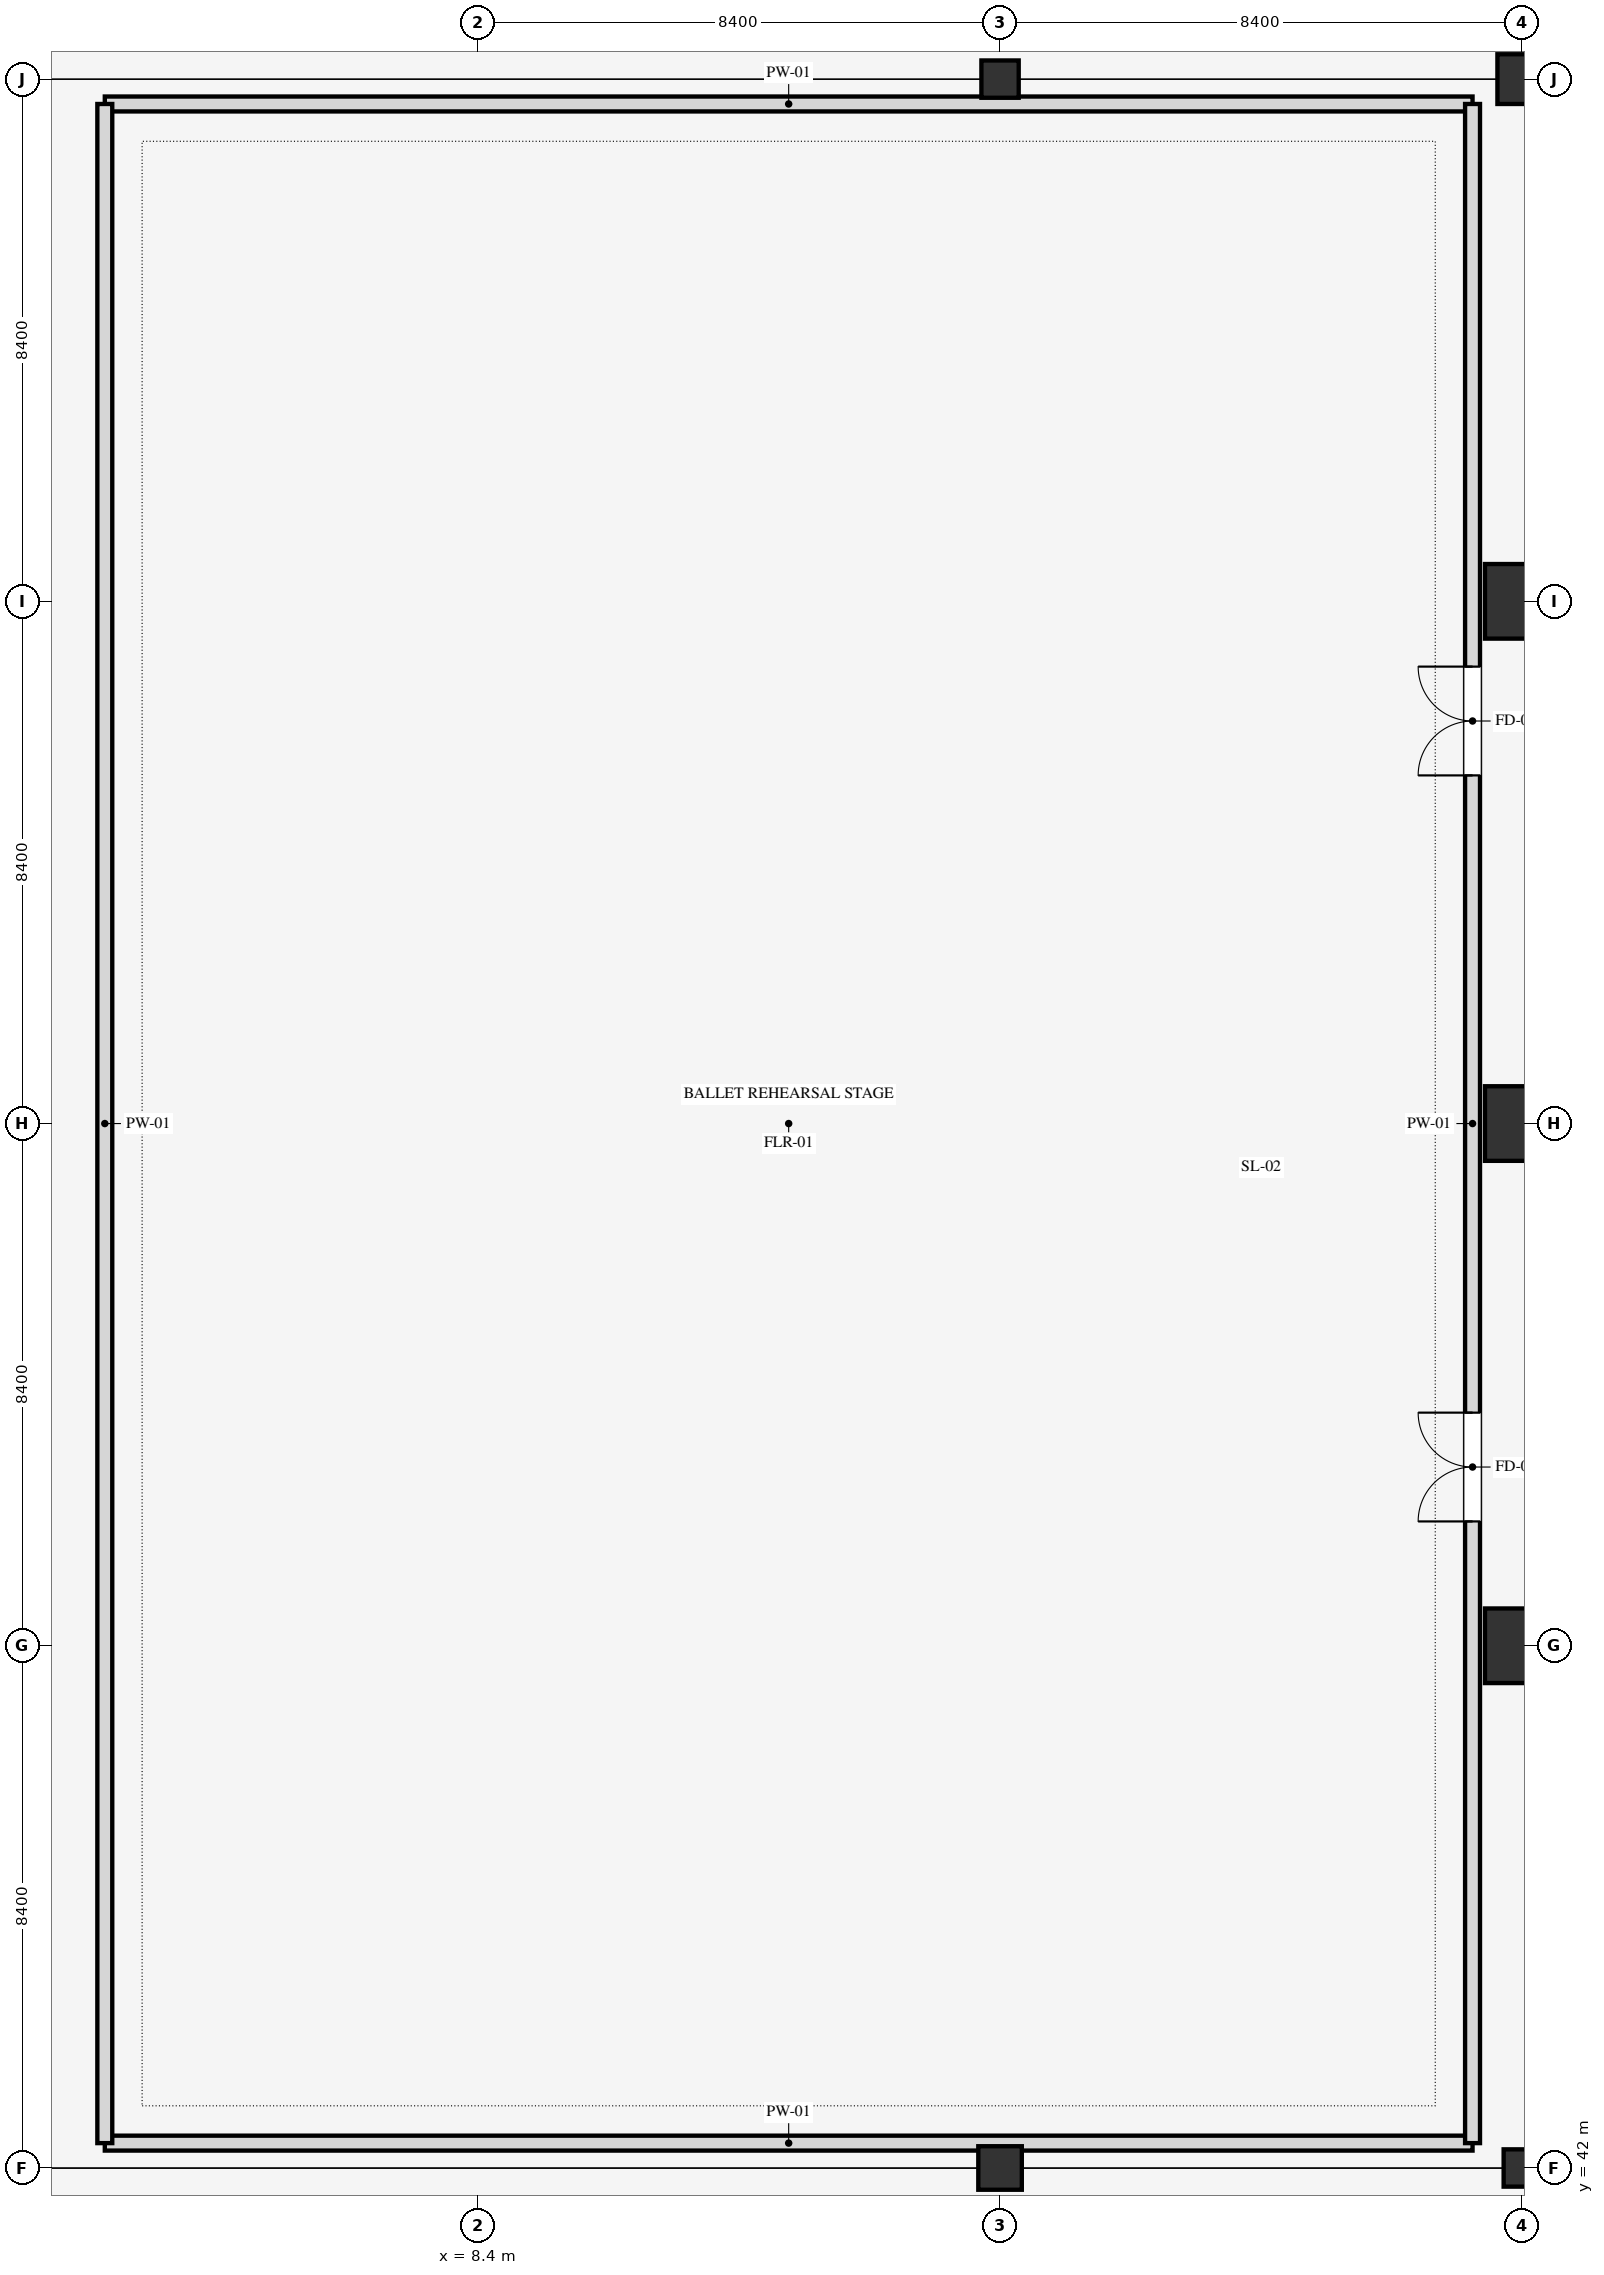
"""IFC4 building model, lengths in metres.
Left out: names, types, materials, properties, quantities, classifications, styles, units other than length and angle.
Written with IfcOpenShell. Run it as: python <this file> out.ifc"""

import sys

from ifc_helpers import new_model, si_unit, direction, frame, frame_2d, origin, origin_2d, place, context, subcontext, project, spatial, rectangle, extrude, element, fill, save


model = new_model("IFC4")
c1 = context("Model", 3, precision=1e-05, world=origin(), true_north=direction((0.0, 1.0)))
c2 = subcontext(c1, "Body", "Model", "MODEL_VIEW")
j1 = project(units=[si_unit("LENGTHUNIT", "METRE"), si_unit("PLANEANGLEUNIT", "RADIAN")], contexts=[c1])
p1 = place(None, origin())
s1 = spatial("IfcSite", under=j1, at=p1, CompositionType="ELEMENT")
p2 = place(p1, origin())
s2 = spatial("IfcBuilding", under=s1, at=p2, CompositionType="ELEMENT")
p3 = place(p2, frame((0.0, 0.0, 9.9)))
s3 = spatial("IfcBuildingStorey", under=s2, at=p3, CompositionType="ELEMENT", Elevation=9.9)
p4 = place(p3, frame((16.8, 42.0, 0.0), z_axis=(0.0, 0.0, 1.0), x_axis=(1.0, 0.0, 0.0)))
e1 = element("IfcColumn", 1, at=p4, inside=s3, PredefinedType="COLUMN", context=c2, shape_type="SweptSolid", body=[
    extrude(rectangle(XDim=0.7, YDim=0.7, at=origin_2d()), origin(), (0.0, 0.0, 1.0), 4.5),
])
for number, where, z_axis, x_axis in (
    (2, (16.8, 75.6, 0.0), (0.0, 0.0, 1.0), (1.0, 0.0, 0.0)),
    (3, (25.2, 42.0, 0.0), (0.0, 0.0, 1.0), (1.0, 0.0, 0.0)),
):
    element("IfcColumn", number, at=place(p3, frame(where, z_axis=z_axis, x_axis=x_axis)), inside=s3, PredefinedType="COLUMN", context=c2, shape_type="SweptSolid", body=[
        extrude(rectangle(XDim=0.6, YDim=0.6, at=origin_2d()), origin(), (0.0, 0.0, 1.0), 4.5),
    ])
for number, where, z_axis, x_axis in (
    (4, (25.2, 50.4, 0.0), (0.0, 0.0, 1.0), (1.0, 0.0, 0.0)),
    (5, (25.2, 58.8, 0.0), (0.0, 0.0, 1.0), (1.0, 0.0, 0.0)),
    (6, (25.2, 67.2, 0.0), (0.0, 0.0, 1.0), (1.0, 0.0, 0.0)),
):
    element("IfcColumn", number, at=place(p3, frame(where, z_axis=z_axis, x_axis=x_axis)), inside=s3, PredefinedType="COLUMN", context=c2, shape_type="SweptSolid", body=[
        extrude(rectangle(XDim=1.2, YDim=1.2, at=origin_2d()), origin(), (0.0, 0.0, 1.0), 4.5),
    ])
p5 = place(p3, frame((25.2, 75.6, 0.0), z_axis=(0.0, 0.0, 1.0), x_axis=(1.0, 0.0, 0.0)))
e7 = element("IfcColumn", 7, at=p5, inside=s3, PredefinedType="COLUMN", context=c2, shape_type="SweptSolid", body=[
    extrude(rectangle(XDim=0.8, YDim=0.8, at=origin_2d()), origin(), (0.0, 0.0, 1.0), 4.5),
])
for number, where, z_axis, x_axis in (
    (8, (2.4, 42.4, 0.0), (0.0, 0.0, 1.0), (1.0, 0.0, 0.0)),
    (9, (2.4, 75.2, 0.0), (0.0, 0.0, 1.0), (1.0, 0.0, 0.0)),
):
    element("IfcWall", number, at=place(p3, frame(where, z_axis=z_axis, x_axis=x_axis)), inside=s3, PredefinedType="PARTITIONING", context=c2, shape_type="SweptSolid", body=[
        extrude(rectangle(XDim=22.0, YDim=0.24, at=frame_2d((11.0, 0.0))), origin(), (0.0, 0.0, 1.0), 3.54),
    ])
p6 = place(p3, frame((2.4, 42.4, 0.0), z_axis=(0.0, 0.0, 1.0), x_axis=(0.0, 1.0, 0.0)))
e10 = element("IfcWall", 10, at=p6, inside=s3, PredefinedType="PARTITIONING", context=c2, shape_type="SweptSolid", body=[
    extrude(rectangle(XDim=32.8, YDim=0.24, at=frame_2d((16.4, 0.0))), origin(), (0.0, 0.0, 1.0), 3.54),
])
p7 = place(p3, frame((24.4, 42.4, 0.0), z_axis=(0.0, 0.0, 1.0), x_axis=(0.0, 1.0, 0.0)))
e11 = element("IfcWall", 11, at=p7, inside=s3, PredefinedType="PARTITIONING", context=c2, shape_type="SweptSolid", body=[
    extrude(rectangle(XDim=32.8, YDim=0.24, at=frame_2d((16.4, 0.0))), origin(), (0.0, 0.0, 1.0), 3.54),
])
p8 = place(p7, frame((10.0, 0.0, 0.0)))
e12 = element("IfcOpeningElement", 12, at=p8, cuts=e11, PredefinedType="OPENING", context=c2, shape_type="SweptSolid", body=[
    extrude(rectangle(XDim=1.75, YDim=2.2, at=frame_2d((0.875, 1.1))), frame((0.0, 0.13, 0.0), z_axis=(0.0, -1.0, 0.0), x_axis=(1.0, 0.0, 0.0)), (0.0, 0.0, 1.0), 0.26),
])
p9 = place(p7, frame((22.0, 0.0, 0.0)))
e13 = element("IfcOpeningElement", 13, at=p9, cuts=e11, PredefinedType="OPENING", context=c2, shape_type="SweptSolid", body=[
    extrude(rectangle(XDim=1.75, YDim=2.2, at=frame_2d((0.875, 1.1))), frame((0.0, 0.13, 0.0), z_axis=(0.0, -1.0, 0.0), x_axis=(1.0, 0.0, 0.0)), (0.0, 0.0, 1.0), 0.26),
])
p10 = place(p8, origin())
e14 = element("IfcDoor", 14, at=p10, inside=s3, OperationType="DOUBLE_DOOR_SINGLE_SWING", PredefinedType="DOOR", context=c2, shape_type="SweptSolid", body=[
    extrude(rectangle(XDim=1.75, YDim=2.2, at=frame_2d((0.875, 1.1))), frame((0.0, 0.025, 0.0), z_axis=(0.0, -1.0, 0.0), x_axis=(1.0, 0.0, 0.0)), (0.0, 0.0, 1.0), 0.05),
])
fill(e12, e14)
p11 = place(p9, origin())
e15 = element("IfcDoor", 15, at=p11, inside=s3, OperationType="DOUBLE_DOOR_SINGLE_SWING", PredefinedType="DOOR", context=c2, shape_type="SweptSolid", body=[
    extrude(rectangle(XDim=1.75, YDim=2.2, at=frame_2d((0.875, 1.1))), frame((0.0, 0.025, 0.0), z_axis=(0.0, -1.0, 0.0), x_axis=(1.0, 0.0, 0.0)), (0.0, 0.0, 1.0), 0.05),
])
fill(e13, e15)
save(model, sys.argv[1])
